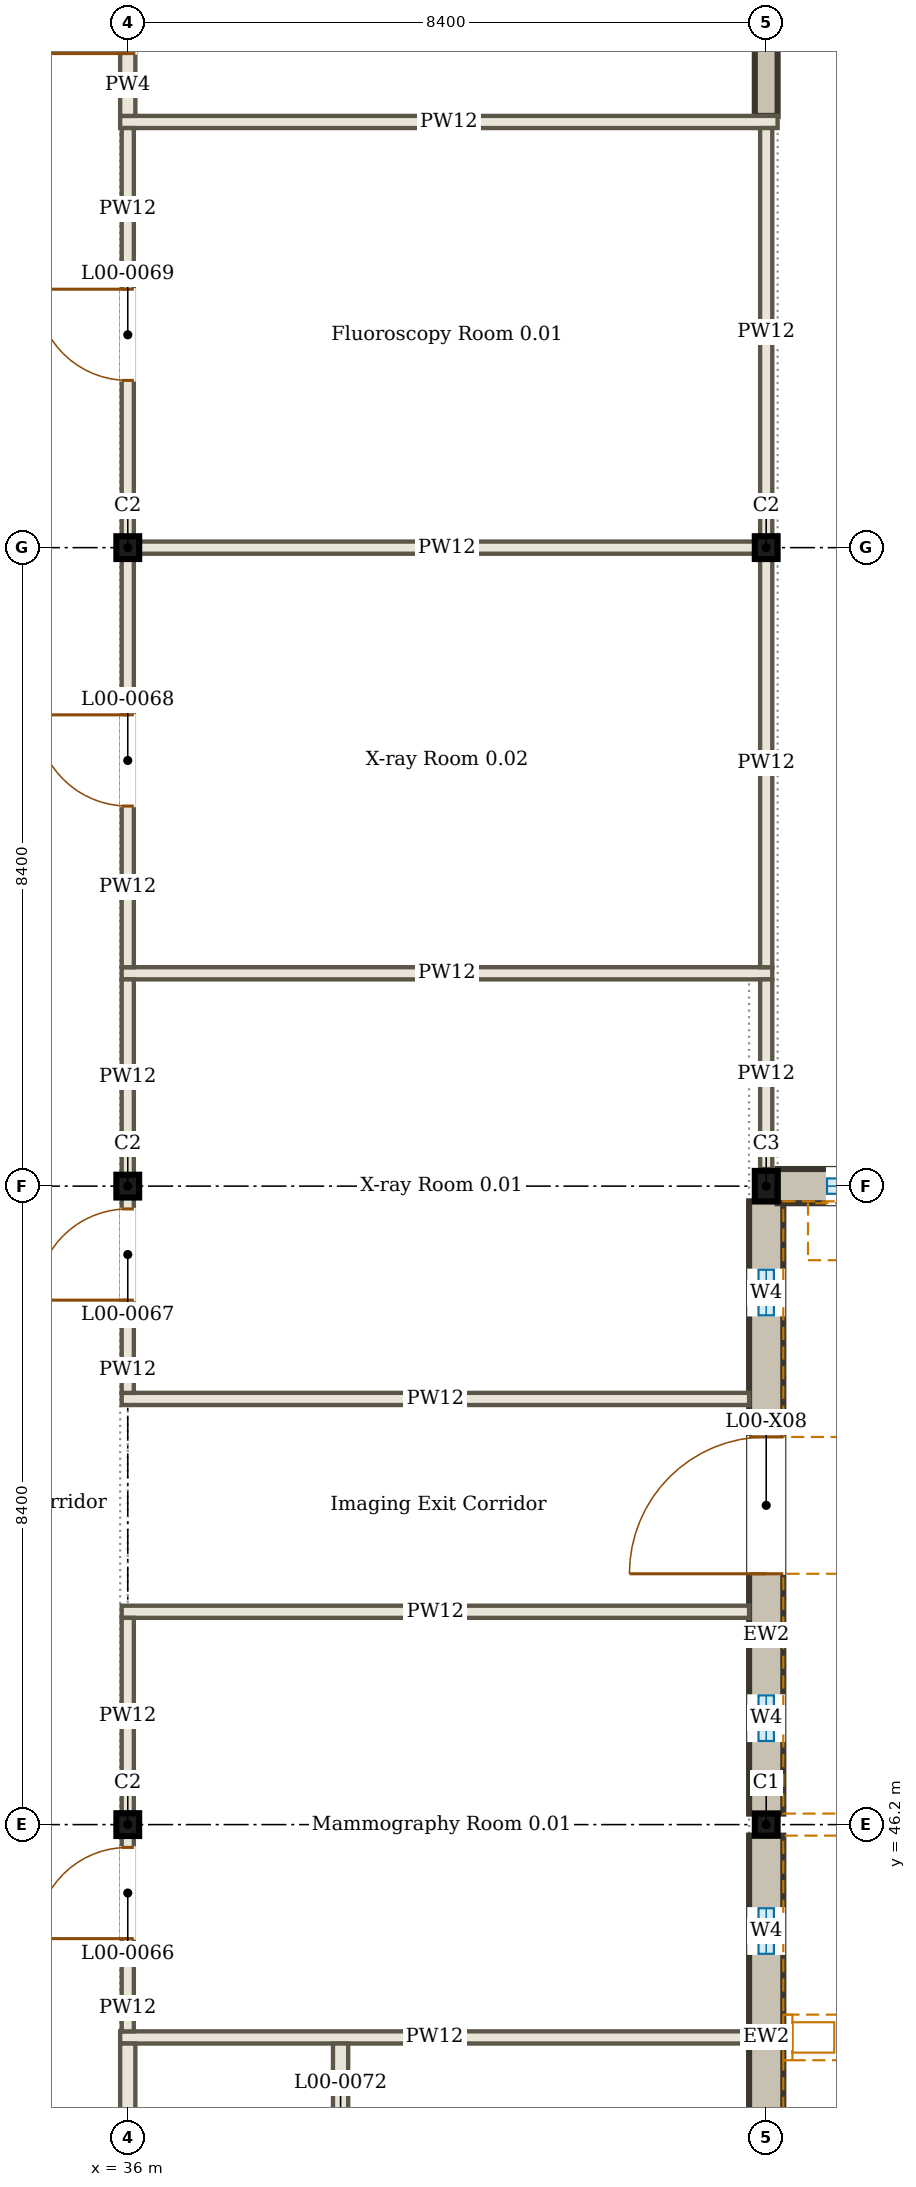
"""IFC4 building model, lengths in metres.
Left out: names, types, materials, properties, quantities, classifications, styles, units other than length and angle.
Written with IfcOpenShell. Run it as: python <this file> out.ifc"""

import sys

from ifc_helpers import new_model, si_unit, direction, frame, frame_2d, origin, origin_2d, place, context, subcontext, project, spatial, rectangle, i_section, extrude, element, fill, save


model = new_model("IFC4")
c1 = context("Model", 3, precision=1e-05, world=origin(), true_north=direction((0.0, 1.0)))
c2 = subcontext(c1, "Body", "Model", "MODEL_VIEW")
j1 = project(units=[si_unit("LENGTHUNIT", "METRE"), si_unit("PLANEANGLEUNIT", "RADIAN")], contexts=[c1])
p1 = place(None, origin())
s1 = spatial("IfcSite", under=j1, at=p1, CompositionType="ELEMENT")
p2 = place(p1, origin())
s2 = spatial("IfcBuilding", under=s1, at=p2, CompositionType="ELEMENT")
p3 = place(p2, origin())
s3 = spatial("IfcBuildingStorey", under=s2, at=p3, CompositionType="ELEMENT", Elevation=0.0)
p4 = place(p3, frame((36.0, 46.2, 0.0), z_axis=(0.0, 0.0, 1.0), x_axis=(1.0, 0.0, 0.0)))
e1 = element("IfcColumn", 1, at=p4, inside=s3, PredefinedType="COLUMN", context=c2, shape_type="SweptSolid", body=[
    extrude(i_section(OverallWidth=0.3, OverallDepth=0.3, WebThickness=0.011, FlangeThickness=0.019, FilletRadius=0.027, at=origin_2d()), origin(), (0.0, 0.0, 1.0), 4.5),
])
p5 = place(p3, frame((44.4, 46.2, 0.0), z_axis=(0.0, 0.0, 1.0), x_axis=(1.0, 0.0, 0.0)))
e2 = element("IfcColumn", 2, at=p5, inside=s3, PredefinedType="COLUMN", context=c2, shape_type="SweptSolid", body=[
    extrude(i_section(OverallWidth=0.3, OverallDepth=0.29, WebThickness=0.009, FlangeThickness=0.014, FilletRadius=0.027, at=origin_2d()), origin(), (0.0, 0.0, 1.0), 4.5),
])
p6 = place(p3, frame((36.0, 54.6, 0.0), z_axis=(0.0, 0.0, 1.0), x_axis=(1.0, 0.0, 0.0)))
e3 = element("IfcColumn", 3, at=p6, inside=s3, PredefinedType="COLUMN", context=c2, shape_type="SweptSolid", body=[
    extrude(i_section(OverallWidth=0.3, OverallDepth=0.3, WebThickness=0.011, FlangeThickness=0.019, FilletRadius=0.027, at=origin_2d()), origin(), (0.0, 0.0, 1.0), 4.5),
])
p7 = place(p3, frame((44.4, 54.6, 0.0), z_axis=(0.0, 0.0, 1.0), x_axis=(1.0, 0.0, 0.0)))
e4 = element("IfcColumn", 4, at=p7, inside=s3, PredefinedType="COLUMN", context=c2, shape_type="SweptSolid", body=[
    extrude(i_section(OverallWidth=0.3, OverallDepth=0.4, WebThickness=0.013, FlangeThickness=0.024, FilletRadius=0.027, at=origin_2d()), origin(), (0.0, 0.0, 1.0), 4.5),
])
for number, where, z_axis, x_axis in (
    (5, (36.0, 63.0, 0.0), (0.0, 0.0, 1.0), (1.0, 0.0, 0.0)),
    (6, (44.4, 63.0, 0.0), (0.0, 0.0, 1.0), (1.0, 0.0, 0.0)),
):
    element("IfcColumn", number, at=place(p3, frame(where, z_axis=z_axis, x_axis=x_axis)), inside=s3, PredefinedType="COLUMN", context=c2, shape_type="SweptSolid", body=[
        extrude(i_section(OverallWidth=0.3, OverallDepth=0.3, WebThickness=0.011, FlangeThickness=0.019, FilletRadius=0.027, at=origin_2d()), origin(), (0.0, 0.0, 1.0), 4.5),
    ])
p8 = place(p3, frame((44.4, 37.8, 0.0), z_axis=(0.0, 0.0, 1.0), x_axis=(0.0, 1.0, 0.0)))
e7 = element("IfcWall", 7, at=p8, inside=s3, PredefinedType="SOLIDWALL", context=c2, shape_type="SweptSolid", body=[
    extrude(rectangle(XDim=8.255, YDim=0.45, at=frame_2d((4.127, 0.0))), origin(), (0.0, 0.0, 1.0), 3.85),
])
p9 = place(p8, frame((1.1, 0.0, 2.1)))
e8 = element("IfcOpeningElement", 8, at=p9, cuts=e7, PredefinedType="OPENING", context=c2, shape_type="SweptSolid", body=[
    extrude(rectangle(XDim=0.6, YDim=1.2, at=frame_2d((0.3, 0.6))), frame((0.0, 0.235, 0.0), z_axis=(0.0, -1.0, 0.0), x_axis=(1.0, 0.0, 0.0)), (0.0, 0.0, 1.0), 0.47),
])
p10 = place(p8, frame((3.9, 0.0, 2.1)))
e9 = element("IfcOpeningElement", 9, at=p10, cuts=e7, PredefinedType="OPENING", context=c2, shape_type="SweptSolid", body=[
    extrude(rectangle(XDim=0.6, YDim=1.2, at=frame_2d((0.3, 0.6))), frame((0.0, 0.235, 0.0), z_axis=(0.0, -1.0, 0.0), x_axis=(1.0, 0.0, 0.0)), (0.0, 0.0, 1.0), 0.47),
])
p11 = place(p8, frame((6.7, 0.0, 2.1)))
e10 = element("IfcOpeningElement", 10, at=p11, cuts=e7, PredefinedType="OPENING", context=c2, shape_type="SweptSolid", body=[
    extrude(rectangle(XDim=0.6, YDim=1.2, at=frame_2d((0.3, 0.6))), frame((0.0, 0.235, 0.0), z_axis=(0.0, -1.0, 0.0), x_axis=(1.0, 0.0, 0.0)), (0.0, 0.0, 1.0), 0.47),
])
p12 = place(p3, frame((44.56, 37.8, 3.87), z_axis=(0.0, 0.0, 1.0), x_axis=(0.0, 1.0, 0.0)))
e11 = element("IfcWall", 11, at=p12, inside=s3, PredefinedType="SOLIDWALL", context=c2, shape_type="SweptSolid", body=[
    extrude(rectangle(XDim=8.255, YDim=0.13, at=frame_2d((4.127, 0.0))), origin(), (0.0, 0.0, 1.0), 0.63),
])
p13 = place(p3, frame((44.4, 46.345, 0.0), z_axis=(0.0, 0.0, 1.0), x_axis=(0.0, 1.0, 0.0)))
e12 = element("IfcWall", 12, at=p13, inside=s3, PredefinedType="SOLIDWALL", context=c2, shape_type="SweptSolid", body=[
    extrude(rectangle(XDim=8.055, YDim=0.45, at=frame_2d((4.027, 0.0))), origin(), (0.0, 0.0, 1.0), 3.85),
])
p14 = place(p13, frame((0.955, 0.0, 2.1)))
e13 = element("IfcOpeningElement", 13, at=p14, cuts=e12, PredefinedType="OPENING", context=c2, shape_type="SweptSolid", body=[
    extrude(rectangle(XDim=0.6, YDim=1.2, at=frame_2d((0.3, 0.6))), frame((0.0, 0.235, 0.0), z_axis=(0.0, -1.0, 0.0), x_axis=(1.0, 0.0, 0.0)), (0.0, 0.0, 1.0), 0.47),
])
p15 = place(p13, frame((6.555, 0.0, 2.1)))
e14 = element("IfcOpeningElement", 14, at=p15, cuts=e12, PredefinedType="OPENING", context=c2, shape_type="SweptSolid", body=[
    extrude(rectangle(XDim=0.6, YDim=1.2, at=frame_2d((0.3, 0.6))), frame((0.0, 0.235, 0.0), z_axis=(0.0, -1.0, 0.0), x_axis=(1.0, 0.0, 0.0)), (0.0, 0.0, 1.0), 0.47),
])
p16 = place(p13, frame((3.155, 0.0, 0.0)))
e15 = element("IfcOpeningElement", 15, at=p16, cuts=e12, PredefinedType="OPENING", context=c2, shape_type="SweptSolid", body=[
    extrude(rectangle(XDim=1.8, YDim=2.1, at=frame_2d((0.9, 1.05))), frame((0.0, 0.235, 0.0), z_axis=(0.0, -1.0, 0.0), x_axis=(1.0, 0.0, 0.0)), (0.0, 0.0, 1.0), 0.47),
])
p17 = place(p3, frame((44.56, 46.345, 3.87), z_axis=(0.0, 0.0, 1.0), x_axis=(0.0, 1.0, 0.0)))
e16 = element("IfcWall", 16, at=p17, inside=s3, PredefinedType="SOLIDWALL", context=c2, shape_type="SweptSolid", body=[
    extrude(rectangle(XDim=8.055, YDim=0.13, at=frame_2d((4.027, 0.0))), origin(), (0.0, 0.0, 1.0), 0.63),
])
p18 = place(p3, frame((44.55, 54.6, 0.0), z_axis=(0.0, 0.0, 1.0), x_axis=(1.0, 0.0, 0.0)))
e17 = element("IfcWall", 17, at=p18, inside=s3, PredefinedType="SOLIDWALL", context=c2, shape_type="SweptSolid", body=[
    extrude(rectangle(XDim=8.1, YDim=0.45, at=frame_2d((4.05, 0.0))), origin(), (0.0, 0.0, 1.0), 4.35),
])
p19 = place(p18, frame((0.65, 0.0, 0.9)))
e18 = element("IfcOpeningElement", 18, at=p19, cuts=e17, PredefinedType="OPENING", context=c2, shape_type="SweptSolid", body=[
    extrude(rectangle(XDim=1.2, YDim=1.8, at=frame_2d((0.6, 0.9))), frame((0.0, 0.235, 0.0), z_axis=(0.0, -1.0, 0.0), x_axis=(1.0, 0.0, 0.0)), (0.0, 0.0, 1.0), 0.47),
])
p20 = place(p18, frame((6.25, 0.0, 0.9)))
e19 = element("IfcOpeningElement", 19, at=p20, cuts=e17, PredefinedType="OPENING", context=c2, shape_type="SweptSolid", body=[
    extrude(rectangle(XDim=1.2, YDim=1.8, at=frame_2d((0.6, 0.9))), frame((0.0, 0.235, 0.0), z_axis=(0.0, -1.0, 0.0), x_axis=(1.0, 0.0, 0.0)), (0.0, 0.0, 1.0), 0.47),
])
p21 = place(p18, frame((3.15, 0.0, 0.0)))
e20 = element("IfcOpeningElement", 20, at=p21, cuts=e17, PredefinedType="OPENING", context=c2, shape_type="SweptSolid", body=[
    extrude(rectangle(XDim=1.8, YDim=2.1, at=frame_2d((0.9, 1.05))), frame((0.0, 0.235, 0.0), z_axis=(0.0, -1.0, 0.0), x_axis=(1.0, 0.0, 0.0)), (0.0, 0.0, 1.0), 0.47),
])
p22 = place(p3, frame((35.9, 43.4, 0.0), z_axis=(0.0, 0.0, 1.0), x_axis=(1.0, 0.0, 0.0)))
e21 = element("IfcWall", 21, at=p22, inside=s3, PredefinedType="PARTITIONING", context=c2, shape_type="SweptSolid", body=[
    extrude(rectangle(XDim=8.275, YDim=0.16, at=frame_2d((4.138, 0.0))), origin(), (0.0, 0.0, 1.0), 3.8),
])
for number, where, z_axis, x_axis in (
    (22, (35.92, 49.0, 0.0), (0.0, 0.0, 1.0), (1.0, 0.0, 0.0)),
    (23, (35.92, 51.8, 0.0), (0.0, 0.0, 1.0), (1.0, 0.0, 0.0)),
):
    element("IfcWall", number, at=place(p3, frame(where, z_axis=z_axis, x_axis=x_axis)), inside=s3, PredefinedType="PARTITIONING", context=c2, shape_type="SweptSolid", body=[
        extrude(rectangle(XDim=8.255, YDim=0.16, at=frame_2d((4.127, 0.0))), origin(), (0.0, 0.0, 1.0), 3.8),
    ])
p23 = place(p3, frame((35.92, 57.4, 0.0), z_axis=(0.0, 0.0, 1.0), x_axis=(1.0, 0.0, 0.0)))
e24 = element("IfcWall", 24, at=p23, inside=s3, PredefinedType="PARTITIONING", context=c2, shape_type="SweptSolid", body=[
    extrude(rectangle(XDim=8.56, YDim=0.16, at=frame_2d((4.28, 0.0))), origin(), (0.0, 0.0, 1.0), 3.8),
])
p24 = place(p3, frame((36.15, 63.0, 0.0), z_axis=(0.0, 0.0, 1.0), x_axis=(1.0, 0.0, 0.0)))
e25 = element("IfcWall", 25, at=p24, inside=s3, PredefinedType="PARTITIONING", context=c2, shape_type="SweptSolid", body=[
    extrude(rectangle(XDim=8.1, YDim=0.16, at=frame_2d((4.05, 0.0))), origin(), (0.0, 0.0, 1.0), 3.8),
])
p25 = place(p3, frame((35.9, 68.6, 0.0), z_axis=(0.0, 0.0, 1.0), x_axis=(1.0, 0.0, 0.0)))
e26 = element("IfcWall", 26, at=p25, inside=s3, PredefinedType="PARTITIONING", context=c2, shape_type="SweptSolid", body=[
    extrude(rectangle(XDim=8.65, YDim=0.16, at=frame_2d((4.325, 0.0))), origin(), (0.0, 0.0, 1.0), 3.8),
])
p26 = place(p3, frame((36.0, 37.8, 0.0), z_axis=(0.0, 0.0, 1.0), x_axis=(0.0, 1.0, 0.0)))
e27 = element("IfcWall", 27, at=p26, inside=s3, PredefinedType="PARTITIONING", context=c2, shape_type="SweptSolid", body=[
    extrude(rectangle(XDim=5.52, YDim=0.2, at=frame_2d((2.76, 0.0))), origin(), (0.0, 0.0, 1.0), 3.8),
])
p27 = place(p26, frame((2.3, 0.0, 0.0)))
e28 = element("IfcOpeningElement", 28, at=p27, cuts=e27, PredefinedType="OPENING", context=c2, shape_type="SweptSolid", body=[
    extrude(rectangle(XDim=1.0, YDim=2.1, at=frame_2d((0.5, 1.05))), frame((0.0, 0.11, 0.0), z_axis=(0.0, -1.0, 0.0), x_axis=(1.0, 0.0, 0.0)), (0.0, 0.0, 1.0), 0.22),
])
p28 = place(p3, frame((36.0, 43.48, 0.0), z_axis=(0.0, 0.0, 1.0), x_axis=(0.0, 1.0, 0.0)))
e29 = element("IfcWall", 29, at=p28, inside=s3, PredefinedType="PARTITIONING", context=c2, shape_type="SweptSolid", body=[
    extrude(rectangle(XDim=2.57, YDim=0.16, at=frame_2d((1.285, 0.0))), origin(), (0.0, 0.0, 1.0), 3.8),
])
p29 = place(p28, frame((1.22, 0.0, 0.0)))
e30 = element("IfcOpeningElement", 30, at=p29, cuts=e29, PredefinedType="OPENING", context=c2, shape_type="SweptSolid", body=[
    extrude(rectangle(XDim=1.2, YDim=2.1, at=frame_2d((0.6, 1.05))), frame((0.0, 0.09, 0.0), z_axis=(0.0, -1.0, 0.0), x_axis=(1.0, 0.0, 0.0)), (0.0, 0.0, 1.0), 0.18),
])
p30 = place(p3, frame((36.0, 46.35, 0.0), z_axis=(0.0, 0.0, 1.0), x_axis=(0.0, 1.0, 0.0)))
e31 = element("IfcWall", 31, at=p30, inside=s3, PredefinedType="PARTITIONING", context=c2, shape_type="SweptSolid", body=[
    extrude(rectangle(XDim=2.57, YDim=0.16, at=frame_2d((1.285, 0.0))), origin(), (0.0, 0.0, 1.0), 3.8),
])
p31 = place(p3, frame((36.0, 51.88, 0.0), z_axis=(0.0, 0.0, 1.0), x_axis=(0.0, 1.0, 0.0)))
e32 = element("IfcWall", 32, at=p31, inside=s3, PredefinedType="PARTITIONING", context=c2, shape_type="SweptSolid", body=[
    extrude(rectangle(XDim=2.57, YDim=0.16, at=frame_2d((1.285, 0.0))), origin(), (0.0, 0.0, 1.0), 3.8),
])
p32 = place(p31, frame((1.22, 0.0, 0.0)))
e33 = element("IfcOpeningElement", 33, at=p32, cuts=e32, PredefinedType="OPENING", context=c2, shape_type="SweptSolid", body=[
    extrude(rectangle(XDim=1.2, YDim=2.1, at=frame_2d((0.6, 1.05))), frame((0.0, 0.09, 0.0), z_axis=(0.0, -1.0, 0.0), x_axis=(1.0, 0.0, 0.0)), (0.0, 0.0, 1.0), 0.18),
])
p33 = place(p3, frame((36.0, 54.75, 0.0), z_axis=(0.0, 0.0, 1.0), x_axis=(0.0, 1.0, 0.0)))
e34 = element("IfcWall", 34, at=p33, inside=s3, PredefinedType="PARTITIONING", context=c2, shape_type="SweptSolid", body=[
    extrude(rectangle(XDim=2.57, YDim=0.16, at=frame_2d((1.285, 0.0))), origin(), (0.0, 0.0, 1.0), 3.8),
])
p34 = place(p3, frame((36.0, 57.48, 0.0), z_axis=(0.0, 0.0, 1.0), x_axis=(0.0, 1.0, 0.0)))
e35 = element("IfcWall", 35, at=p34, inside=s3, PredefinedType="PARTITIONING", context=c2, shape_type="SweptSolid", body=[
    extrude(rectangle(XDim=5.37, YDim=0.16, at=frame_2d((2.685, 0.0))), origin(), (0.0, 0.0, 1.0), 3.8),
])
p35 = place(p34, frame((2.12, 0.0, 0.0)))
e36 = element("IfcOpeningElement", 36, at=p35, cuts=e35, PredefinedType="OPENING", context=c2, shape_type="SweptSolid", body=[
    extrude(rectangle(XDim=1.2, YDim=2.1, at=frame_2d((0.6, 1.05))), frame((0.0, 0.09, 0.0), z_axis=(0.0, -1.0, 0.0), x_axis=(1.0, 0.0, 0.0)), (0.0, 0.0, 1.0), 0.18),
])
p36 = place(p3, frame((36.0, 63.15, 0.0), z_axis=(0.0, 0.0, 1.0), x_axis=(0.0, 1.0, 0.0)))
e37 = element("IfcWall", 37, at=p36, inside=s3, PredefinedType="PARTITIONING", context=c2, shape_type="SweptSolid", body=[
    extrude(rectangle(XDim=5.37, YDim=0.16, at=frame_2d((2.685, 0.0))), origin(), (0.0, 0.0, 1.0), 3.8),
])
p37 = place(p36, frame((2.05, 0.0, 0.0)))
e38 = element("IfcOpeningElement", 38, at=p37, cuts=e37, PredefinedType="OPENING", context=c2, shape_type="SweptSolid", body=[
    extrude(rectangle(XDim=1.2, YDim=2.1, at=frame_2d((0.6, 1.05))), frame((0.0, 0.09, 0.0), z_axis=(0.0, -1.0, 0.0), x_axis=(1.0, 0.0, 0.0)), (0.0, 0.0, 1.0), 0.18),
])
p38 = place(p3, frame((36.0, 68.68, 0.0), z_axis=(0.0, 0.0, 1.0), x_axis=(0.0, 1.0, 0.0)))
e39 = element("IfcWall", 39, at=p38, inside=s3, PredefinedType="PARTITIONING", context=c2, shape_type="SweptSolid", body=[
    extrude(rectangle(XDim=2.525, YDim=0.2, at=frame_2d((1.262, 0.0))), origin(), (0.0, 0.0, 1.0), 3.8),
])
p39 = place(p38, frame((0.82, 0.0, 0.0)))
e40 = element("IfcOpeningElement", 40, at=p39, cuts=e39, PredefinedType="OPENING", context=c2, shape_type="SweptSolid", body=[
    extrude(rectangle(XDim=1.0, YDim=2.1, at=frame_2d((0.5, 1.05))), frame((0.0, 0.11, 0.0), z_axis=(0.0, -1.0, 0.0), x_axis=(1.0, 0.0, 0.0)), (0.0, 0.0, 1.0), 0.22),
])
p40 = place(p3, frame((38.8, 40.675, 0.0), z_axis=(0.0, 0.0, 1.0), x_axis=(0.0, 1.0, 0.0)))
e41 = element("IfcWall", 41, at=p40, inside=s3, PredefinedType="PARTITIONING", context=c2, shape_type="SweptSolid", body=[
    extrude(rectangle(XDim=2.645, YDim=0.2, at=frame_2d((1.323, 0.0))), origin(), (0.0, 0.0, 1.0), 3.95),
])
p41 = place(p40, frame((0.875, 0.0, 0.0)))
e42 = element("IfcOpeningElement", 42, at=p41, cuts=e41, PredefinedType="OPENING", context=c2, shape_type="SweptSolid", body=[
    extrude(rectangle(XDim=0.9, YDim=2.1, at=frame_2d((0.45, 1.05))), frame((0.0, 0.11, 0.0), z_axis=(0.0, -1.0, 0.0), x_axis=(1.0, 0.0, 0.0)), (0.0, 0.0, 1.0), 0.22),
])
p42 = place(p3, frame((44.4, 54.825, 0.0), z_axis=(0.0, 0.0, 1.0), x_axis=(0.0, 1.0, 0.0)))
e43 = element("IfcWall", 43, at=p42, inside=s3, PredefinedType="PARTITIONING", context=c2, shape_type="SweptSolid", body=[
    extrude(rectangle(XDim=2.495, YDim=0.16, at=frame_2d((1.248, 0.0))), origin(), (0.0, 0.0, 1.0), 3.85),
])
for number, where, z_axis, x_axis in (
    (44, (44.4, 57.48, 0.0), (0.0, 0.0, 1.0), (0.0, 1.0, 0.0)),
    (45, (44.4, 63.15, 0.0), (0.0, 0.0, 1.0), (0.0, 1.0, 0.0)),
):
    element("IfcWall", number, at=place(p3, frame(where, z_axis=z_axis, x_axis=x_axis)), inside=s3, PredefinedType="PARTITIONING", context=c2, shape_type="SweptSolid", body=[
        extrude(rectangle(XDim=5.37, YDim=0.16, at=frame_2d((2.685, 0.0))), origin(), (0.0, 0.0, 1.0), 3.85),
    ])
p43 = place(p3, frame((44.4, 68.68, 0.0), z_axis=(0.0, 0.0, 1.0), x_axis=(0.0, 1.0, 0.0)))
e46 = element("IfcWall", 46, at=p43, inside=s3, PredefinedType="SOLIDWALL", context=c2, shape_type="SweptSolid", body=[
    extrude(rectangle(XDim=2.525, YDim=0.3, at=frame_2d((1.262, 0.0))), origin(), (0.0, 0.0, 1.0), 3.85),
])
p44 = place(p11, origin())
e47 = element("IfcWindow", 47, at=p44, inside=s3, PartitioningType="SINGLE_PANEL", PredefinedType="WINDOW", context=c2, shape_type="SweptSolid", body=[
    extrude(rectangle(XDim=0.6, YDim=1.2, at=frame_2d((0.3, 0.6))), frame((0.0, 0.135, 0.0), z_axis=(0.0, -1.0, 0.0), x_axis=(1.0, 0.0, 0.0)), (0.0, 0.0, 1.0), 0.06),
])
fill(e10, e47)
p45 = place(p14, origin())
e48 = element("IfcWindow", 48, at=p45, inside=s3, PartitioningType="SINGLE_PANEL", PredefinedType="WINDOW", context=c2, shape_type="SweptSolid", body=[
    extrude(rectangle(XDim=0.6, YDim=1.2, at=frame_2d((0.3, 0.6))), frame((0.0, 0.135, 0.0), z_axis=(0.0, -1.0, 0.0), x_axis=(1.0, 0.0, 0.0)), (0.0, 0.0, 1.0), 0.06),
])
fill(e13, e48)
p46 = place(p15, origin())
e49 = element("IfcWindow", 49, at=p46, inside=s3, PartitioningType="SINGLE_PANEL", PredefinedType="WINDOW", context=c2, shape_type="SweptSolid", body=[
    extrude(rectangle(XDim=0.6, YDim=1.2, at=frame_2d((0.3, 0.6))), frame((0.0, 0.135, 0.0), z_axis=(0.0, -1.0, 0.0), x_axis=(1.0, 0.0, 0.0)), (0.0, 0.0, 1.0), 0.06),
])
fill(e14, e49)
p47 = place(p19, origin())
e50 = element("IfcWindow", 50, at=p47, inside=s3, PartitioningType="SINGLE_PANEL", PredefinedType="WINDOW", context=c2, shape_type="SweptSolid", body=[
    extrude(rectangle(XDim=1.2, YDim=1.8, at=frame_2d((0.6, 0.9))), frame((0.0, 0.135, 0.0), z_axis=(0.0, -1.0, 0.0), x_axis=(1.0, 0.0, 0.0)), (0.0, 0.0, 1.0), 0.06),
])
fill(e18, e50)
p48 = place(p16, origin())
e51 = element("IfcDoor", 51, at=p48, inside=s3, OperationType="SINGLE_SWING_LEFT", PredefinedType="DOOR", context=c2, shape_type="SweptSolid", body=[
    extrude(rectangle(XDim=1.8, YDim=2.1, at=frame_2d((0.9, 1.05))), frame((0.0, 0.025, 0.0), z_axis=(0.0, -1.0, 0.0), x_axis=(1.0, 0.0, 0.0)), (0.0, 0.0, 1.0), 0.05),
])
fill(e15, e51)
p49 = place(p29, origin())
e52 = element("IfcDoor", 52, at=p49, inside=s3, OperationType="SINGLE_SWING_LEFT", PredefinedType="DOOR", context=c2, shape_type="SweptSolid", body=[
    extrude(rectangle(XDim=1.2, YDim=2.1, at=frame_2d((0.6, 1.05))), frame((0.0, 0.025, 0.0), z_axis=(0.0, -1.0, 0.0), x_axis=(1.0, 0.0, 0.0)), (0.0, 0.0, 1.0), 0.05),
])
fill(e30, e52)
p50 = place(p32, origin())
e53 = element("IfcDoor", 53, at=p50, inside=s3, OperationType="SINGLE_SWING_LEFT", PredefinedType="DOOR", context=c2, shape_type="SweptSolid", body=[
    extrude(rectangle(XDim=1.2, YDim=2.1, at=frame_2d((0.6, 1.05))), frame((0.0, 0.025, 0.0), z_axis=(0.0, -1.0, 0.0), x_axis=(1.0, 0.0, 0.0)), (0.0, 0.0, 1.0), 0.05),
])
fill(e33, e53)
p51 = place(p35, origin())
e54 = element("IfcDoor", 54, at=p51, inside=s3, OperationType="SINGLE_SWING_RIGHT", PredefinedType="DOOR", context=c2, shape_type="SweptSolid", body=[
    extrude(rectangle(XDim=1.2, YDim=2.1, at=frame_2d((0.6, 1.05))), frame((0.0, 0.025, 0.0), z_axis=(0.0, -1.0, 0.0), x_axis=(1.0, 0.0, 0.0)), (0.0, 0.0, 1.0), 0.05),
])
fill(e36, e54)
p52 = place(p37, origin())
e55 = element("IfcDoor", 55, at=p52, inside=s3, OperationType="SINGLE_SWING_RIGHT", PredefinedType="DOOR", context=c2, shape_type="SweptSolid", body=[
    extrude(rectangle(XDim=1.2, YDim=2.1, at=frame_2d((0.6, 1.05))), frame((0.0, 0.025, 0.0), z_axis=(0.0, -1.0, 0.0), x_axis=(1.0, 0.0, 0.0)), (0.0, 0.0, 1.0), 0.05),
])
fill(e38, e55)
p53 = place(p39, origin())
e56 = element("IfcDoor", 56, at=p53, inside=s3, OperationType="SINGLE_SWING_LEFT", PredefinedType="DOOR", context=c2, shape_type="SweptSolid", body=[
    extrude(rectangle(XDim=1.0, YDim=2.1, at=frame_2d((0.5, 1.05))), frame((0.0, 0.025, 0.0), z_axis=(0.0, -1.0, 0.0), x_axis=(1.0, 0.0, 0.0)), (0.0, 0.0, 1.0), 0.05),
])
fill(e40, e56)
save(model, sys.argv[1])
